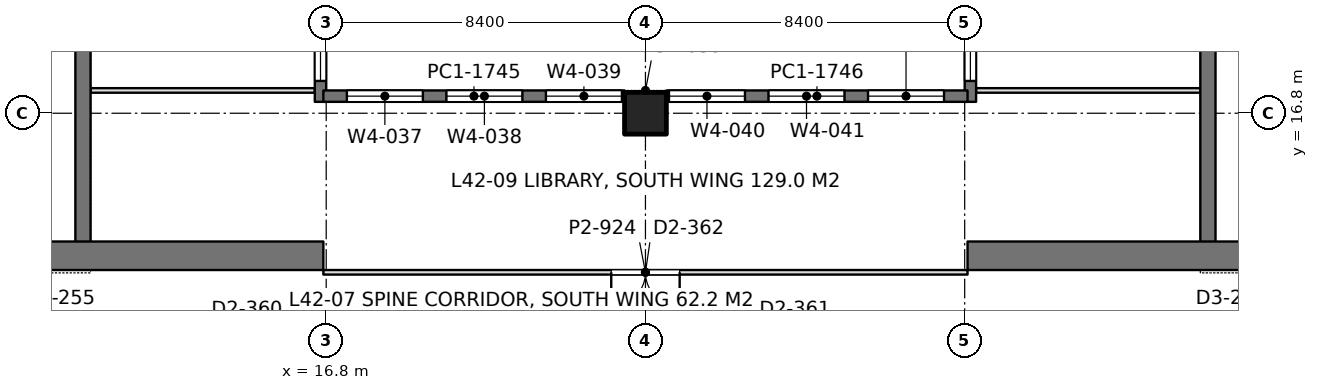
"""IFC4 building model, lengths in metres.
Left out: names, types, materials, properties, quantities, classifications, styles, units other than length and angle.
Written with IfcOpenShell. Run it as: python <this file> out.ifc"""

import sys

from ifc_helpers import new_model, si_unit, direction, frame, frame_2d, origin, origin_2d, place, context, subcontext, project, spatial, rectangle, extrude, element, fill, save


model = new_model("IFC4")
c1 = context("Model", 3, precision=1e-05, world=origin(), true_north=direction((0.0, 1.0)))
c2 = subcontext(c1, "Body", "Model", "MODEL_VIEW")
j1 = project(units=[si_unit("LENGTHUNIT", "METRE"), si_unit("PLANEANGLEUNIT", "RADIAN")], contexts=[c1])
p1 = place(None, origin())
s1 = spatial("IfcSite", under=j1, at=p1, CompositionType="ELEMENT")
p2 = place(p1, origin())
s2 = spatial("IfcBuilding", under=s1, at=p2, CompositionType="ELEMENT")
p3 = place(p2, frame((0.0, 0.0, 186.0)))
s3 = spatial("IfcBuildingStorey", under=s2, at=p3, CompositionType="ELEMENT", Elevation=186.0)
p4 = place(p3, frame((25.2, 16.8, 0.0), z_axis=(0.0, 0.0, 1.0), x_axis=(1.0, 0.0, 0.0)))
e1 = element("IfcColumn", 1, at=p4, inside=s3, PredefinedType="COLUMN", context=c2, shape_type="SweptSolid", body=[
    extrude(rectangle(XDim=1.1, YDim=1.1, at=origin_2d()), origin(), (0.0, 0.0, 1.0), 4.2),
])
p5 = place(p3, frame((-1.125, 13.05, 0.0), z_axis=(0.0, 0.0, 1.0), x_axis=(1.0, 0.0, 0.0)))
e2 = element("IfcWall", 2, at=p5, inside=s3, PredefinedType="SHEAR", context=c2, shape_type="SweptSolid", body=[
    extrude(rectangle(XDim=17.85, YDim=0.75, at=frame_2d((8.925, 0.0))), origin(), (0.0, 0.0, 1.0), 4.2),
])
p6 = place(p5, frame((8.875, 0.0, 0.0)))
e3 = element("IfcOpeningElement", 3, at=p6, cuts=e2, PredefinedType="OPENING", context=c2, shape_type="SweptSolid", body=[
    extrude(rectangle(XDim=1.8, YDim=2.4, at=frame_2d((0.9, 1.2))), frame((0.0, 0.385, 0.0), z_axis=(0.0, -1.0, 0.0), x_axis=(1.0, 0.0, 0.0)), (0.0, 0.0, 1.0), 0.77),
])
p7 = place(p3, frame((10.4, 13.05, 0.0), z_axis=(0.0, 0.0, 1.0), x_axis=(0.0, 1.0, 0.0)))
e4 = element("IfcWall", 4, at=p7, inside=s3, PredefinedType="SHEAR", context=c2, shape_type="SweptSolid", body=[
    extrude(rectangle(XDim=24.3, YDim=0.4, at=frame_2d((12.15, 0.0))), origin(), (0.0, 0.0, 1.0), 4.2),
])
p8 = place(p7, frame((15.75, 0.0, 0.0)))
e5 = element("IfcOpeningElement", 5, at=p8, cuts=e4, PredefinedType="OPENING", context=c2, shape_type="SweptSolid", body=[
    extrude(rectangle(XDim=1.1, YDim=2.2, at=frame_2d((0.55, 1.1))), frame((0.0, 0.21, 0.0), z_axis=(0.0, -1.0, 0.0), x_axis=(1.0, 0.0, 0.0)), (0.0, 0.0, 1.0), 0.42),
])
p9 = place(p7, frame((18.6, 0.0, 0.0)))
e6 = element("IfcOpeningElement", 6, at=p9, cuts=e4, PredefinedType="OPENING", context=c2, shape_type="SweptSolid", body=[
    extrude(rectangle(XDim=1.1, YDim=2.2, at=frame_2d((0.55, 1.1))), frame((0.0, 0.21, 0.0), z_axis=(0.0, -1.0, 0.0), x_axis=(1.0, 0.0, 0.0)), (0.0, 0.0, 1.0), 0.42),
])
p10 = place(p7, frame((21.45, 0.0, 0.0)))
e7 = element("IfcOpeningElement", 7, at=p10, cuts=e4, PredefinedType="OPENING", context=c2, shape_type="SweptSolid", body=[
    extrude(rectangle(XDim=1.1, YDim=2.2, at=frame_2d((0.55, 1.1))), frame((0.0, 0.21, 0.0), z_axis=(0.0, -1.0, 0.0), x_axis=(1.0, 0.0, 0.0)), (0.0, 0.0, 1.0), 0.42),
])
p11 = place(p7, frame((6.05, 0.0, 0.0)))
e8 = element("IfcOpeningElement", 8, at=p11, cuts=e4, PredefinedType="OPENING", context=c2, shape_type="SweptSolid", body=[
    extrude(rectangle(XDim=1.8, YDim=2.4, at=frame_2d((0.9, 1.2))), frame((0.0, 0.21, 0.0), z_axis=(0.0, -1.0, 0.0), x_axis=(1.0, 0.0, 0.0)), (0.0, 0.0, 1.0), 0.42),
])
p12 = place(p7, frame((11.25, 0.0, 0.0)))
e9 = element("IfcOpeningElement", 9, at=p12, cuts=e4, PredefinedType="OPENING", context=c2, shape_type="SweptSolid", body=[
    extrude(rectangle(XDim=1.8, YDim=2.4, at=frame_2d((0.9, 1.2))), frame((0.0, 0.21, 0.0), z_axis=(0.0, -1.0, 0.0), x_axis=(1.0, 0.0, 0.0)), (0.0, 0.0, 1.0), 0.42),
])
p13 = place(p3, frame((33.675, 13.05, 0.0), z_axis=(0.0, 0.0, 1.0), x_axis=(1.0, 0.0, 0.0)))
e10 = element("IfcWall", 10, at=p13, inside=s3, PredefinedType="SHEAR", context=c2, shape_type="SweptSolid", body=[
    extrude(rectangle(XDim=17.85, YDim=0.75, at=frame_2d((8.925, 0.0))), origin(), (0.0, 0.0, 1.0), 4.2),
])
p14 = place(p13, frame((7.175, 0.0, 0.0)))
e11 = element("IfcOpeningElement", 11, at=p14, cuts=e10, PredefinedType="OPENING", context=c2, shape_type="SweptSolid", body=[
    extrude(rectangle(XDim=1.8, YDim=2.4, at=frame_2d((0.9, 1.2))), frame((0.0, 0.385, 0.0), z_axis=(0.0, -1.0, 0.0), x_axis=(1.0, 0.0, 0.0)), (0.0, 0.0, 1.0), 0.77),
])
p15 = place(p3, frame((40.0, 13.05, 0.0), z_axis=(0.0, 0.0, 1.0), x_axis=(0.0, 1.0, 0.0)))
e12 = element("IfcWall", 12, at=p15, inside=s3, PredefinedType="SHEAR", context=c2, shape_type="SweptSolid", body=[
    extrude(rectangle(XDim=24.3, YDim=0.4, at=frame_2d((12.15, 0.0))), origin(), (0.0, 0.0, 1.0), 4.2),
])
p16 = place(p15, frame((15.75, 0.0, 0.0)))
e13 = element("IfcOpeningElement", 13, at=p16, cuts=e12, PredefinedType="OPENING", context=c2, shape_type="SweptSolid", body=[
    extrude(rectangle(XDim=1.1, YDim=2.2, at=frame_2d((0.55, 1.1))), frame((0.0, 0.21, 0.0), z_axis=(0.0, -1.0, 0.0), x_axis=(1.0, 0.0, 0.0)), (0.0, 0.0, 1.0), 0.42),
])
p17 = place(p15, frame((18.6, 0.0, 0.0)))
e14 = element("IfcOpeningElement", 14, at=p17, cuts=e12, PredefinedType="OPENING", context=c2, shape_type="SweptSolid", body=[
    extrude(rectangle(XDim=1.1, YDim=2.2, at=frame_2d((0.55, 1.1))), frame((0.0, 0.21, 0.0), z_axis=(0.0, -1.0, 0.0), x_axis=(1.0, 0.0, 0.0)), (0.0, 0.0, 1.0), 0.42),
])
p18 = place(p15, frame((21.45, 0.0, 0.0)))
e15 = element("IfcOpeningElement", 15, at=p18, cuts=e12, PredefinedType="OPENING", context=c2, shape_type="SweptSolid", body=[
    extrude(rectangle(XDim=1.1, YDim=2.2, at=frame_2d((0.55, 1.1))), frame((0.0, 0.21, 0.0), z_axis=(0.0, -1.0, 0.0), x_axis=(1.0, 0.0, 0.0)), (0.0, 0.0, 1.0), 0.42),
])
p19 = place(p15, frame((6.05, 0.0, 0.0)))
e16 = element("IfcOpeningElement", 16, at=p19, cuts=e12, PredefinedType="OPENING", context=c2, shape_type="SweptSolid", body=[
    extrude(rectangle(XDim=1.8, YDim=2.4, at=frame_2d((0.9, 1.2))), frame((0.0, 0.21, 0.0), z_axis=(0.0, -1.0, 0.0), x_axis=(1.0, 0.0, 0.0)), (0.0, 0.0, 1.0), 0.42),
])
p20 = place(p15, frame((11.25, 0.0, 0.0)))
e17 = element("IfcOpeningElement", 17, at=p20, cuts=e12, PredefinedType="OPENING", context=c2, shape_type="SweptSolid", body=[
    extrude(rectangle(XDim=1.8, YDim=2.4, at=frame_2d((0.9, 1.2))), frame((0.0, 0.21, 0.0), z_axis=(0.0, -1.0, 0.0), x_axis=(1.0, 0.0, 0.0)), (0.0, 0.0, 1.0), 0.42),
])
p21 = place(p3, frame((16.65, 17.1, 0.0), z_axis=(0.0, 0.0, 1.0), x_axis=(0.0, 1.0, 0.0)))
e18 = element("IfcWall", 18, at=p21, inside=s3, PredefinedType="SOLIDWALL", context=c2, shape_type="SweptSolid", body=[
    extrude(rectangle(XDim=10.7, YDim=0.3, at=frame_2d((5.35, 0.0))), origin(), (0.0, 0.0, 1.0), 4.05),
])
p22 = place(p21, frame((0.55, 0.0, 0.9)))
e19 = element("IfcOpeningElement", 19, at=p22, cuts=e18, PredefinedType="OPENING", context=c2, shape_type="SweptSolid", body=[
    extrude(rectangle(XDim=2.0, YDim=1.9, at=frame_2d((1.0, 0.95))), frame((0.0, 0.16, 0.0), z_axis=(0.0, -1.0, 0.0), x_axis=(1.0, 0.0, 0.0)), (0.0, 0.0, 1.0), 0.32),
])
p23 = place(p21, frame((2.9, 0.0, 0.9)))
e20 = element("IfcOpeningElement", 20, at=p23, cuts=e18, PredefinedType="OPENING", context=c2, shape_type="SweptSolid", body=[
    extrude(rectangle(XDim=2.0, YDim=1.9, at=frame_2d((1.0, 0.95))), frame((0.0, 0.16, 0.0), z_axis=(0.0, -1.0, 0.0), x_axis=(1.0, 0.0, 0.0)), (0.0, 0.0, 1.0), 0.32),
])
p24 = place(p21, frame((7.675, 0.0, 0.9)))
e21 = element("IfcOpeningElement", 21, at=p24, cuts=e18, PredefinedType="OPENING", context=c2, shape_type="SweptSolid", body=[
    extrude(rectangle(XDim=2.0, YDim=1.9, at=frame_2d((1.0, 0.95))), frame((0.0, 0.16, 0.0), z_axis=(0.0, -1.0, 0.0), x_axis=(1.0, 0.0, 0.0)), (0.0, 0.0, 1.0), 0.32),
])
p25 = place(p3, frame((33.75, 17.1, 0.0), z_axis=(0.0, 0.0, 1.0), x_axis=(0.0, 1.0, 0.0)))
e22 = element("IfcWall", 22, at=p25, inside=s3, PredefinedType="SOLIDWALL", context=c2, shape_type="SweptSolid", body=[
    extrude(rectangle(XDim=10.7, YDim=0.3, at=frame_2d((5.35, 0.0))), origin(), (0.0, 0.0, 1.0), 4.05),
])
p26 = place(p25, frame((0.55, 0.0, 0.9)))
e23 = element("IfcOpeningElement", 23, at=p26, cuts=e22, PredefinedType="OPENING", context=c2, shape_type="SweptSolid", body=[
    extrude(rectangle(XDim=2.0, YDim=1.9, at=frame_2d((1.0, 0.95))), frame((0.0, 0.16, 0.0), z_axis=(0.0, -1.0, 0.0), x_axis=(1.0, 0.0, 0.0)), (0.0, 0.0, 1.0), 0.32),
])
p27 = place(p25, frame((2.9, 0.0, 0.9)))
e24 = element("IfcOpeningElement", 24, at=p27, cuts=e22, PredefinedType="OPENING", context=c2, shape_type="SweptSolid", body=[
    extrude(rectangle(XDim=2.0, YDim=1.9, at=frame_2d((1.0, 0.95))), frame((0.0, 0.16, 0.0), z_axis=(0.0, -1.0, 0.0), x_axis=(1.0, 0.0, 0.0)), (0.0, 0.0, 1.0), 0.32),
])
p28 = place(p25, frame((7.675, 0.0, 0.9)))
e25 = element("IfcOpeningElement", 25, at=p28, cuts=e22, PredefinedType="OPENING", context=c2, shape_type="SweptSolid", body=[
    extrude(rectangle(XDim=2.0, YDim=1.9, at=frame_2d((1.0, 0.95))), frame((0.0, 0.16, 0.0), z_axis=(0.0, -1.0, 0.0), x_axis=(1.0, 0.0, 0.0)), (0.0, 0.0, 1.0), 0.32),
])
p29 = place(p3, frame((16.725, 17.25, 0.0), z_axis=(0.0, 0.0, 1.0), x_axis=(1.0, 0.0, 0.0)))
e26 = element("IfcWall", 26, at=p29, inside=s3, PredefinedType="SOLIDWALL", context=c2, shape_type="SweptSolid", body=[
    extrude(rectangle(XDim=7.925, YDim=0.3, at=frame_2d((3.962, 0.0))), origin(), (0.0, 0.0, 1.0), 4.05),
])
p30 = place(p29, frame((0.619, 0.0, 0.9)))
e27 = element("IfcOpeningElement", 27, at=p30, cuts=e26, PredefinedType="OPENING", context=c2, shape_type="SweptSolid", body=[
    extrude(rectangle(XDim=2.0, YDim=1.9, at=frame_2d((1.0, 0.95))), frame((0.0, 0.16, 0.0), z_axis=(0.0, -1.0, 0.0), x_axis=(1.0, 0.0, 0.0)), (0.0, 0.0, 1.0), 0.32),
])
p31 = place(p29, frame((3.238, 0.0, 0.9)))
e28 = element("IfcOpeningElement", 28, at=p31, cuts=e26, PredefinedType="OPENING", context=c2, shape_type="SweptSolid", body=[
    extrude(rectangle(XDim=2.0, YDim=1.9, at=frame_2d((1.0, 0.95))), frame((0.0, 0.16, 0.0), z_axis=(0.0, -1.0, 0.0), x_axis=(1.0, 0.0, 0.0)), (0.0, 0.0, 1.0), 0.32),
])
p32 = place(p29, frame((5.856, 0.0, 0.9)))
e29 = element("IfcOpeningElement", 29, at=p32, cuts=e26, PredefinedType="OPENING", context=c2, shape_type="SweptSolid", body=[
    extrude(rectangle(XDim=2.0, YDim=1.9, at=frame_2d((1.0, 0.95))), frame((0.0, 0.16, 0.0), z_axis=(0.0, -1.0, 0.0), x_axis=(1.0, 0.0, 0.0)), (0.0, 0.0, 1.0), 0.32),
])
p33 = place(p3, frame((25.75, 17.25, 0.0), z_axis=(0.0, 0.0, 1.0), x_axis=(1.0, 0.0, 0.0)))
e30 = element("IfcWall", 30, at=p33, inside=s3, PredefinedType="SOLIDWALL", context=c2, shape_type="SweptSolid", body=[
    extrude(rectangle(XDim=7.925, YDim=0.3, at=frame_2d((3.962, 0.0))), origin(), (0.0, 0.0, 1.0), 4.05),
])
p34 = place(p33, frame((0.069, 0.0, 0.9)))
e31 = element("IfcOpeningElement", 31, at=p34, cuts=e30, PredefinedType="OPENING", context=c2, shape_type="SweptSolid", body=[
    extrude(rectangle(XDim=2.0, YDim=1.9, at=frame_2d((1.0, 0.95))), frame((0.0, 0.16, 0.0), z_axis=(0.0, -1.0, 0.0), x_axis=(1.0, 0.0, 0.0)), (0.0, 0.0, 1.0), 0.32),
])
p35 = place(p33, frame((2.688, 0.0, 0.9)))
e32 = element("IfcOpeningElement", 32, at=p35, cuts=e30, PredefinedType="OPENING", context=c2, shape_type="SweptSolid", body=[
    extrude(rectangle(XDim=2.0, YDim=1.9, at=frame_2d((1.0, 0.95))), frame((0.0, 0.16, 0.0), z_axis=(0.0, -1.0, 0.0), x_axis=(1.0, 0.0, 0.0)), (0.0, 0.0, 1.0), 0.32),
])
p36 = place(p33, frame((5.306, 0.0, 0.9)))
e33 = element("IfcOpeningElement", 33, at=p36, cuts=e30, PredefinedType="OPENING", context=c2, shape_type="SweptSolid", body=[
    extrude(rectangle(XDim=2.0, YDim=1.9, at=frame_2d((1.0, 0.95))), frame((0.0, 0.16, 0.0), z_axis=(0.0, -1.0, 0.0), x_axis=(1.0, 0.0, 0.0)), (0.0, 0.0, 1.0), 0.32),
])
for number, where, z_axis, x_axis in (
    (34, (10.598, 17.4, 0.0), (0.0, 0.0, 1.0), (1.0, 0.0, 0.0)),
    (35, (33.898, 17.4, 0.0), (0.0, 0.0, 1.0), (1.0, 0.0, 0.0)),
):
    element("IfcWall", number, at=place(p3, frame(where, z_axis=z_axis, x_axis=x_axis)), inside=s3, PredefinedType="PARTITIONING", context=c2, shape_type="SweptSolid", body=[
        extrude(rectangle(XDim=5.904, YDim=0.12, at=frame_2d((2.952, 0.0))), origin(), (0.0, 0.0, 1.0), 3.55),
    ])
p37 = place(p3, frame((16.725, 12.615, 0.0), z_axis=(0.0, 0.0, 1.0), x_axis=(1.0, 0.0, 0.0)))
e36 = element("IfcWall", 36, at=p37, inside=s3, PredefinedType="PARTITIONING", context=c2, shape_type="SweptSolid", body=[
    extrude(rectangle(XDim=16.95, YDim=0.12, at=frame_2d((8.475, 0.0))), origin(), (0.0, 0.0, 1.0), 3.55),
])
p38 = place(p37, frame((7.575, 0.0, 0.0)))
e37 = element("IfcOpeningElement", 37, at=p38, cuts=e36, PredefinedType="OPENING", context=c2, shape_type="SweptSolid", body=[
    extrude(rectangle(XDim=1.8, YDim=2.2, at=frame_2d((0.9, 1.1))), frame((0.0, 0.07, 0.0), z_axis=(0.0, -1.0, 0.0), x_axis=(1.0, 0.0, 0.0)), (0.0, 0.0, 1.0), 0.14),
])
p39 = place(p22, origin())
e38 = element("IfcWindow", 38, at=p39, inside=s3, PartitioningType="SINGLE_PANEL", PredefinedType="WINDOW", context=c2, shape_type="SweptSolid", body=[
    extrude(rectangle(XDim=2.0, YDim=1.9, at=frame_2d((1.0, 0.95))), frame((0.0, 0.03, 0.0), z_axis=(0.0, -1.0, 0.0), x_axis=(1.0, 0.0, 0.0)), (0.0, 0.0, 1.0), 0.06),
])
fill(e19, e38)
p40 = place(p26, origin())
e39 = element("IfcWindow", 39, at=p40, inside=s3, PartitioningType="SINGLE_PANEL", PredefinedType="WINDOW", context=c2, shape_type="SweptSolid", body=[
    extrude(rectangle(XDim=2.0, YDim=1.9, at=frame_2d((1.0, 0.95))), frame((0.0, 0.03, 0.0), z_axis=(0.0, -1.0, 0.0), x_axis=(1.0, 0.0, 0.0)), (0.0, 0.0, 1.0), 0.06),
])
fill(e23, e39)
p41 = place(p30, origin())
e40 = element("IfcWindow", 40, at=p41, inside=s3, PartitioningType="SINGLE_PANEL", PredefinedType="WINDOW", context=c2, shape_type="SweptSolid", body=[
    extrude(rectangle(XDim=2.0, YDim=1.9, at=frame_2d((1.0, 0.95))), frame((0.0, 0.03, 0.0), z_axis=(0.0, -1.0, 0.0), x_axis=(1.0, 0.0, 0.0)), (0.0, 0.0, 1.0), 0.06),
])
fill(e27, e40)
p42 = place(p31, origin())
e41 = element("IfcWindow", 41, at=p42, inside=s3, PartitioningType="SINGLE_PANEL", PredefinedType="WINDOW", context=c2, shape_type="SweptSolid", body=[
    extrude(rectangle(XDim=2.0, YDim=1.9, at=frame_2d((1.0, 0.95))), frame((0.0, 0.03, 0.0), z_axis=(0.0, -1.0, 0.0), x_axis=(1.0, 0.0, 0.0)), (0.0, 0.0, 1.0), 0.06),
])
fill(e28, e41)
p43 = place(p32, origin())
e42 = element("IfcWindow", 42, at=p43, inside=s3, PartitioningType="SINGLE_PANEL", PredefinedType="WINDOW", context=c2, shape_type="SweptSolid", body=[
    extrude(rectangle(XDim=2.0, YDim=1.9, at=frame_2d((1.0, 0.95))), frame((0.0, 0.03, 0.0), z_axis=(0.0, -1.0, 0.0), x_axis=(1.0, 0.0, 0.0)), (0.0, 0.0, 1.0), 0.06),
])
fill(e29, e42)
p44 = place(p34, origin())
e43 = element("IfcWindow", 43, at=p44, inside=s3, PartitioningType="SINGLE_PANEL", PredefinedType="WINDOW", context=c2, shape_type="SweptSolid", body=[
    extrude(rectangle(XDim=2.0, YDim=1.9, at=frame_2d((1.0, 0.95))), frame((0.0, 0.03, 0.0), z_axis=(0.0, -1.0, 0.0), x_axis=(1.0, 0.0, 0.0)), (0.0, 0.0, 1.0), 0.06),
])
fill(e31, e43)
p45 = place(p35, origin())
e44 = element("IfcWindow", 44, at=p45, inside=s3, PartitioningType="SINGLE_PANEL", PredefinedType="WINDOW", context=c2, shape_type="SweptSolid", body=[
    extrude(rectangle(XDim=2.0, YDim=1.9, at=frame_2d((1.0, 0.95))), frame((0.0, 0.03, 0.0), z_axis=(0.0, -1.0, 0.0), x_axis=(1.0, 0.0, 0.0)), (0.0, 0.0, 1.0), 0.06),
])
fill(e32, e44)
p46 = place(p36, origin())
e45 = element("IfcWindow", 45, at=p46, inside=s3, PartitioningType="SINGLE_PANEL", PredefinedType="WINDOW", context=c2, shape_type="SweptSolid", body=[
    extrude(rectangle(XDim=2.0, YDim=1.9, at=frame_2d((1.0, 0.95))), frame((0.0, 0.03, 0.0), z_axis=(0.0, -1.0, 0.0), x_axis=(1.0, 0.0, 0.0)), (0.0, 0.0, 1.0), 0.06),
])
fill(e33, e45)
p47 = place(p38, frame((1.8, 0.0, 0.0), z_axis=(0.0, 0.0, 1.0), x_axis=(-1.0, 0.0, 0.0)))
e46 = element("IfcDoor", 46, at=p47, inside=s3, OperationType="DOUBLE_DOOR_SINGLE_SWING", PredefinedType="DOOR", context=c2, shape_type="SweptSolid", body=[
    extrude(rectangle(XDim=1.8, YDim=2.2, at=frame_2d((0.9, 1.1))), frame((0.0, 0.025, 0.0), z_axis=(0.0, -1.0, 0.0), x_axis=(1.0, 0.0, 0.0)), (0.0, 0.0, 1.0), 0.05),
])
fill(e37, e46)
save(model, sys.argv[1])
